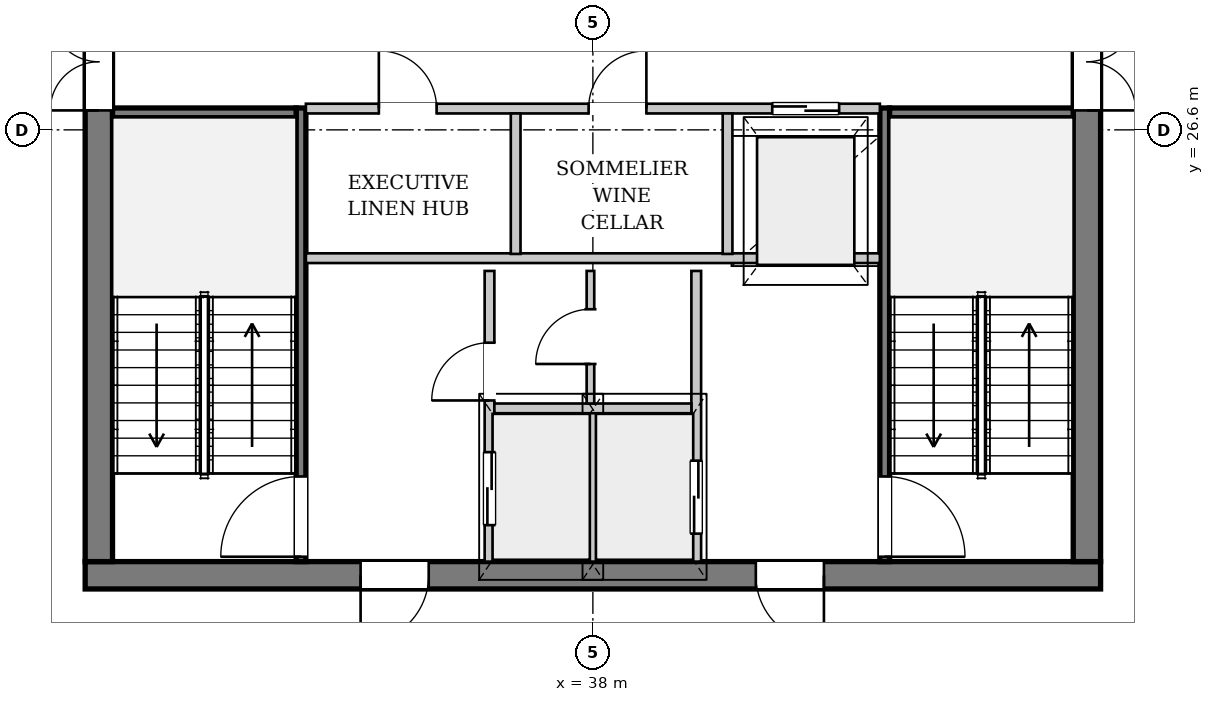
"""IFC4 building model, lengths in metres.
Left out: names, types, materials, properties, quantities, classifications, styles, units other than length and angle.
Written with IfcOpenShell. Run it as: python <this file> out.ifc"""

import sys

from ifc_helpers import new_model, si_unit, direction, frame, frame_2d, origin, place, context, subcontext, project, spatial, rectangle, extrude, source, transform, mapped, element, fill, save


model = new_model("IFC4")
c1 = context("Model", 3, precision=1e-05, world=origin(), true_north=direction((0.0, 1.0)))
c2 = subcontext(c1, "Body", "Model", "MODEL_VIEW")
j1 = project(units=[si_unit("LENGTHUNIT", "METRE"), si_unit("PLANEANGLEUNIT", "RADIAN")], contexts=[c1])
p1 = place(None, origin())
s1 = spatial("IfcSite", under=j1, at=p1, CompositionType="ELEMENT")
p2 = place(p1, origin())
s2 = spatial("IfcBuilding", under=s1, at=p2, CompositionType="ELEMENT")
p3 = place(p2, frame((0.0, 0.0, 252.5)))
s3 = spatial("IfcBuildingStorey", under=s2, at=p3, CompositionType="ELEMENT", Elevation=252.5)
p4 = place(p3, frame((52.264, 25.817, 0.0), z_axis=(0.0, 0.0, 1.0), x_axis=(-0.329283040193, -0.944231263749, 0.0)))
e1 = element("IfcWall", 1, at=p4, inside=s3, PredefinedType="SOLIDWALL", context=c2, shape_type="SweptSolid", body=[
    extrude(rectangle(XDim=22.663, YDim=0.32, at=frame_2d((11.332, 0.0))), origin(), (0.0, 0.0, 1.0), 2.872),
])
p5 = place(p4, frame((6.502, 0.0, 0.0)))
e2 = element("IfcOpeningElement", 2, at=p5, cuts=e1, PredefinedType="OPENING", context=c2, shape_type="SweptSolid", body=[
    extrude(rectangle(XDim=1.5, YDim=2.3, at=frame_2d((0.75, 1.15))), frame((0.0, 0.17, 0.0), z_axis=(0.0, -1.0, 0.0), x_axis=(1.0, 0.0, 0.0)), (0.0, 0.0, 1.0), 0.34),
])
p6 = place(p4, frame((15.471, 0.0, 0.402)))
e3 = element("IfcOpeningElement", 3, at=p6, cuts=e1, PredefinedType="OPENING", context=c2, shape_type="SweptSolid", body=[
    extrude(rectangle(XDim=2.6, YDim=2.35, at=frame_2d((1.3, 1.175))), frame((0.0, 0.17, 0.0), z_axis=(0.0, -1.0, 0.0), x_axis=(1.0, 0.0, 0.0)), (0.0, 0.0, 1.0), 0.34),
])
p7 = place(p3, frame((46.35, 19.275, 0.0), z_axis=(0.0, 0.0, 1.0), x_axis=(-1.0, 0.0, 0.0)))
e4 = element("IfcWall", 4, at=p7, inside=s3, PredefinedType="SHEAR", context=c2, shape_type="SweptSolid", body=[
    extrude(rectangle(XDim=16.7, YDim=0.45, at=frame_2d((8.35, 0.0))), origin(), (0.0, 0.0, 1.0), 3.38),
])
p8 = place(p7, frame((4.55, 0.0, 0.0)))
e5 = element("IfcOpeningElement", 5, at=p8, cuts=e4, PredefinedType="OPENING", context=c2, shape_type="SweptSolid", body=[
    extrude(rectangle(XDim=1.12, YDim=2.25, at=frame_2d((0.56, 1.125))), frame((0.0, 0.235, 0.0), z_axis=(0.0, -1.0, 0.0), x_axis=(1.0, 0.0, 0.0)), (0.0, 0.0, 1.0), 0.47),
])
p9 = place(p7, frame((11.05, 0.0, 0.0)))
e6 = element("IfcOpeningElement", 6, at=p9, cuts=e4, PredefinedType="OPENING", context=c2, shape_type="SweptSolid", body=[
    extrude(rectangle(XDim=1.12, YDim=2.25, at=frame_2d((0.56, 1.125))), frame((0.0, 0.235, 0.0), z_axis=(0.0, -1.0, 0.0), x_axis=(1.0, 0.0, 0.0)), (0.0, 0.0, 1.0), 0.47),
])
p10 = place(p3, frame((29.875, 19.5, 0.0), z_axis=(0.0, 0.0, 1.0), x_axis=(0.0, 1.0, 0.0)))
e7 = element("IfcWall", 7, at=p10, inside=s3, PredefinedType="SHEAR", context=c2, shape_type="SweptSolid", body=[
    extrude(rectangle(XDim=14.2, YDim=0.45, at=frame_2d((7.1, 0.0))), origin(), (0.0, 0.0, 1.0), 3.38),
])
p11 = place(p10, frame((7.42, 0.0, 0.0)))
e8 = element("IfcOpeningElement", 8, at=p11, cuts=e7, PredefinedType="OPENING", context=c2, shape_type="SweptSolid", body=[
    extrude(rectangle(XDim=1.6, YDim=2.2, at=frame_2d((0.8, 1.1))), frame((0.0, 0.235, 0.0), z_axis=(0.0, -1.0, 0.0), x_axis=(1.0, 0.0, 0.0)), (0.0, 0.0, 1.0), 0.47),
])
p12 = place(p3, frame((46.125, 33.7, 0.0), z_axis=(0.0, 0.0, 1.0), x_axis=(0.0, -1.0, 0.0)))
e9 = element("IfcWall", 9, at=p12, inside=s3, PredefinedType="SHEAR", context=c2, shape_type="SweptSolid", body=[
    extrude(rectangle(XDim=14.2, YDim=0.45, at=frame_2d((7.1, 0.0))), origin(), (0.0, 0.0, 1.0), 3.38),
])
p13 = place(p12, frame((5.18, 0.0, 0.0)))
e10 = element("IfcOpeningElement", 10, at=p13, cuts=e9, PredefinedType="OPENING", context=c2, shape_type="SweptSolid", body=[
    extrude(rectangle(XDim=1.6, YDim=2.2, at=frame_2d((0.8, 1.1))), frame((0.0, 0.235, 0.0), z_axis=(0.0, -1.0, 0.0), x_axis=(1.0, 0.0, 0.0)), (0.0, 0.0, 1.0), 0.47),
])
p14 = place(p12, frame((2.05, 0.0, 0.0)))
e11 = element("IfcOpeningElement", 11, at=p14, cuts=e9, PredefinedType="OPENING", context=c2, shape_type="SweptSolid", body=[
    extrude(rectangle(XDim=0.95, YDim=2.1, at=frame_2d((0.475, 1.05))), frame((0.0, 0.235, 0.0), z_axis=(0.0, -1.0, 0.0), x_axis=(1.0, 0.0, 0.0)), (0.0, 0.0, 1.0), 0.47),
])
p15 = place(p3, frame((33.2, 19.5, 0.0), z_axis=(0.0, 0.0, 1.0), x_axis=(0.0, 1.0, 0.0)))
e12 = element("IfcWall", 12, at=p15, inside=s3, PredefinedType="PARTITIONING", context=c2, shape_type="SweptSolid", body=[
    extrude(rectangle(XDim=7.46, YDim=0.16, at=frame_2d((3.73, 0.0))), origin(), (0.0, 0.0, 1.0), 3.38),
])
p16 = place(p15, frame((0.08, 0.0, 0.0)))
e13 = element("IfcOpeningElement", 13, at=p16, cuts=e12, PredefinedType="OPENING", context=c2, shape_type="SweptSolid", body=[
    extrude(rectangle(XDim=1.32, YDim=2.2, at=frame_2d((0.66, 1.1))), frame((0.0, 0.09, 0.0), z_axis=(0.0, -1.0, 0.0), x_axis=(1.0, 0.0, 0.0)), (0.0, 0.0, 1.0), 0.18),
])
p17 = place(p3, frame((30.1, 26.88, 0.0), z_axis=(0.0, 0.0, 1.0), x_axis=(1.0, 0.0, 0.0)))
e14 = element("IfcWall", 14, at=p17, inside=s3, PredefinedType="PARTITIONING", context=c2, shape_type="SweptSolid", body=[
    extrude(rectangle(XDim=3.02, YDim=0.16, at=frame_2d((1.51, 0.0))), origin(), (0.0, 0.0, 1.0), 3.38),
])
p18 = place(p3, frame((42.8, 26.96, 0.0), z_axis=(0.0, 0.0, 1.0), x_axis=(0.0, -1.0, 0.0)))
e15 = element("IfcWall", 15, at=p18, inside=s3, PredefinedType="PARTITIONING", context=c2, shape_type="SweptSolid", body=[
    extrude(rectangle(XDim=7.46, YDim=0.16, at=frame_2d((3.73, 0.0))), origin(), (0.0, 0.0, 1.0), 3.38),
])
p19 = place(p18, frame((6.06, 0.0, 0.0)))
e16 = element("IfcOpeningElement", 16, at=p19, cuts=e15, PredefinedType="OPENING", context=c2, shape_type="SweptSolid", body=[
    extrude(rectangle(XDim=1.32, YDim=2.2, at=frame_2d((0.66, 1.1))), frame((0.0, 0.09, 0.0), z_axis=(0.0, -1.0, 0.0), x_axis=(1.0, 0.0, 0.0)), (0.0, 0.0, 1.0), 0.18),
])
p20 = place(p3, frame((42.88, 26.88, 0.0), z_axis=(0.0, 0.0, 1.0), x_axis=(1.0, 0.0, 0.0)))
e17 = element("IfcWall", 17, at=p20, inside=s3, PredefinedType="PARTITIONING", context=c2, shape_type="SweptSolid", body=[
    extrude(rectangle(XDim=3.02, YDim=0.16, at=frame_2d((1.51, 0.0))), origin(), (0.0, 0.0, 1.0), 3.38),
])
p21 = place(p3, frame((36.3, 19.5, 0.0), z_axis=(0.0, 0.0, 1.0), x_axis=(0.0, 1.0, 0.0)))
e18 = element("IfcWall", 18, at=p21, inside=s3, PredefinedType="PARTITIONING", context=c2, shape_type="SweptSolid", body=[
    extrude(rectangle(XDim=4.78, YDim=0.16, at=frame_2d((2.39, 0.0))), origin(), (0.0, 0.0, 1.0), 3.38),
])
p22 = place(p21, frame((0.6, 0.0, 0.0)))
e19 = element("IfcOpeningElement", 19, at=p22, cuts=e18, PredefinedType="OPENING", context=c2, shape_type="SweptSolid", body=[
    extrude(rectangle(XDim=1.2, YDim=2.2, at=frame_2d((0.6, 1.1))), frame((0.0, 0.09, 0.0), z_axis=(0.0, -1.0, 0.0), x_axis=(1.0, 0.0, 0.0)), (0.0, 0.0, 1.0), 0.18),
])
p23 = place(p21, frame((2.65, 0.0, 0.0)))
e20 = element("IfcOpeningElement", 20, at=p23, cuts=e18, PredefinedType="OPENING", context=c2, shape_type="SweptSolid", body=[
    extrude(rectangle(XDim=0.95, YDim=2.1, at=frame_2d((0.475, 1.05))), frame((0.0, 0.09, 0.0), z_axis=(0.0, -1.0, 0.0), x_axis=(1.0, 0.0, 0.0)), (0.0, 0.0, 1.0), 0.18),
])
p24 = place(p3, frame((39.7, 24.28, 0.0), z_axis=(0.0, 0.0, 1.0), x_axis=(0.0, -1.0, 0.0)))
e21 = element("IfcWall", 21, at=p24, inside=s3, PredefinedType="PARTITIONING", context=c2, shape_type="SweptSolid", body=[
    extrude(rectangle(XDim=4.78, YDim=0.16, at=frame_2d((2.39, 0.0))), origin(), (0.0, 0.0, 1.0), 3.38),
])
p25 = place(p24, frame((3.12, 0.0, 0.0)))
e22 = element("IfcOpeningElement", 22, at=p25, cuts=e21, PredefinedType="OPENING", context=c2, shape_type="SweptSolid", body=[
    extrude(rectangle(XDim=1.2, YDim=2.2, at=frame_2d((0.6, 1.1))), frame((0.0, 0.09, 0.0), z_axis=(0.0, -1.0, 0.0), x_axis=(1.0, 0.0, 0.0)), (0.0, 0.0, 1.0), 0.18),
])
p26 = place(p3, frame((38.0, 19.5, 0.0), z_axis=(0.0, 0.0, 1.0), x_axis=(0.0, 1.0, 0.0)))
e23 = element("IfcWall", 23, at=p26, inside=s3, PredefinedType="PARTITIONING", context=c2, shape_type="SweptSolid", body=[
    extrude(rectangle(XDim=2.46, YDim=0.125, at=frame_2d((1.23, 0.0))), origin(), (0.0, 0.0, 1.0), 3.38),
])
p27 = place(p3, frame((36.38, 22.02, 0.0), z_axis=(0.0, 0.0, 1.0), x_axis=(1.0, 0.0, 0.0)))
e24 = element("IfcWall", 24, at=p27, inside=s3, PredefinedType="PARTITIONING", context=c2, shape_type="SweptSolid", body=[
    extrude(rectangle(XDim=3.24, YDim=0.16, at=frame_2d((1.62, 0.0))), origin(), (0.0, 0.0, 1.0), 3.38),
])
p28 = place(p3, frame((33.28, 24.49, 0.0), z_axis=(0.0, 0.0, 1.0), x_axis=(1.0, 0.0, 0.0)))
e25 = element("IfcWall", 25, at=p28, inside=s3, PredefinedType="PARTITIONING", context=c2, shape_type="SweptSolid", body=[
    extrude(rectangle(XDim=9.44, YDim=0.16, at=frame_2d((4.72, 0.0))), origin(), (0.0, 0.0, 1.0), 3.38),
])
p29 = place(p3, frame((37.96, 22.1, 0.0), z_axis=(0.0, 0.0, 1.0), x_axis=(0.0, 1.0, 0.0)))
e26 = element("IfcWall", 26, at=p29, inside=s3, PredefinedType="PARTITIONING", context=c2, shape_type="SweptSolid", body=[
    extrude(rectangle(XDim=2.18, YDim=0.125, at=frame_2d((1.09, 0.0))), origin(), (0.0, 0.0, 1.0), 3.38),
])
p30 = place(p29, frame((0.65, 0.0, 0.0)))
e27 = element("IfcOpeningElement", 27, at=p30, cuts=e26, PredefinedType="OPENING", context=c2, shape_type="SweptSolid", body=[
    extrude(rectangle(XDim=0.9, YDim=2.1, at=frame_2d((0.45, 1.05))), frame((0.0, 0.073, 0.0), z_axis=(0.0, -1.0, 0.0), x_axis=(1.0, 0.0, 0.0)), (0.0, 0.0, 1.0), 0.145),
])
p31 = place(p3, frame((33.28, 26.95, 0.0), z_axis=(0.0, 0.0, 1.0), x_axis=(1.0, 0.0, 0.0)))
e28 = element("IfcWall", 28, at=p31, inside=s3, PredefinedType="PARTITIONING", context=c2, shape_type="SweptSolid", body=[
    extrude(rectangle(XDim=9.44, YDim=0.16, at=frame_2d((4.72, 0.0))), origin(), (0.0, 0.0, 1.0), 3.38),
])
p32 = place(p31, frame((1.2, 0.0, 0.0)))
e29 = element("IfcOpeningElement", 29, at=p32, cuts=e28, PredefinedType="OPENING", context=c2, shape_type="SweptSolid", body=[
    extrude(rectangle(XDim=0.95, YDim=2.1, at=frame_2d((0.475, 1.05))), frame((0.0, 0.09, 0.0), z_axis=(0.0, -1.0, 0.0), x_axis=(1.0, 0.0, 0.0)), (0.0, 0.0, 1.0), 0.18),
])
p33 = place(p31, frame((4.65, 0.0, 0.0)))
e30 = element("IfcOpeningElement", 30, at=p33, cuts=e28, PredefinedType="OPENING", context=c2, shape_type="SweptSolid", body=[
    extrude(rectangle(XDim=0.95, YDim=2.1, at=frame_2d((0.475, 1.05))), frame((0.0, 0.09, 0.0), z_axis=(0.0, -1.0, 0.0), x_axis=(1.0, 0.0, 0.0)), (0.0, 0.0, 1.0), 0.18),
])
p34 = place(p31, frame((7.67, 0.0, 0.0)))
e31 = element("IfcOpeningElement", 31, at=p34, cuts=e28, PredefinedType="OPENING", context=c2, shape_type="SweptSolid", body=[
    extrude(rectangle(XDim=1.1, YDim=2.2, at=frame_2d((0.55, 1.1))), frame((0.0, 0.09, 0.0), z_axis=(0.0, -1.0, 0.0), x_axis=(1.0, 0.0, 0.0)), (0.0, 0.0, 1.0), 0.18),
])
for number, where, z_axis, x_axis in (
    (32, (36.73, 24.56, 0.0), (0.0, 0.0, 1.0), (0.0, 1.0, 0.0)),
    (33, (40.215, 24.56, 0.0), (0.0, 0.0, 1.0), (0.0, 1.0, 0.0)),
):
    element("IfcWall", number, at=place(p3, frame(where, z_axis=z_axis, x_axis=x_axis)), inside=s3, PredefinedType="PARTITIONING", context=c2, shape_type="SweptSolid", body=[
        extrude(rectangle(XDim=2.31, YDim=0.16, at=frame_2d((1.155, 0.0))), origin(), (0.0, 0.0, 1.0), 3.38),
    ])
m1 = source(origin(), c2, "Body", "SweptSolid", [
    extrude(rectangle(XDim=1.12, YDim=2.25, at=frame_2d((0.56, 1.125))), frame((0.0, 0.025, 0.0), z_axis=(0.0, -1.0, 0.0), x_axis=(1.0, 0.0, 0.0)), (0.0, 0.0, 1.0), 0.05),
])
p35 = place(p8, origin())
e34 = element("IfcDoor", 34, at=p35, inside=s3, OperationType="SINGLE_SWING_LEFT", PredefinedType="DOOR", context=c2, shape_type="MappedRepresentation", body=[
    mapped(m1, transform((0.0, 0.0, 0.0), x_axis=(1.0, 0.0, 0.0), y_axis=(0.0, 1.0, 0.0), z_axis=(0.0, 0.0, 1.0), scale=1.0)),
])
fill(e5, e34)
p36 = place(p9, origin())
e35 = element("IfcDoor", 35, at=p36, inside=s3, OperationType="SINGLE_SWING_RIGHT", PredefinedType="DOOR", context=c2, shape_type="MappedRepresentation", body=[
    mapped(m1, transform((0.0, 0.0, 0.0), x_axis=(1.0, 0.0, 0.0), y_axis=(0.0, 1.0, 0.0), z_axis=(0.0, 0.0, 1.0), scale=1.0)),
])
fill(e6, e35)
m2 = source(origin(), c2, "Body", "SweptSolid", [
    extrude(rectangle(XDim=1.6, YDim=2.2, at=frame_2d((0.8, 1.1))), frame((0.0, 0.025, 0.0), z_axis=(0.0, -1.0, 0.0), x_axis=(1.0, 0.0, 0.0)), (0.0, 0.0, 1.0), 0.05),
])
p37 = place(p11, origin())
e36 = element("IfcDoor", 36, at=p37, inside=s3, OperationType="DOUBLE_DOOR_SINGLE_SWING", PredefinedType="DOOR", context=c2, shape_type="MappedRepresentation", body=[
    mapped(m2, transform((0.0, 0.0, 0.0), x_axis=(1.0, 0.0, 0.0), y_axis=(0.0, 1.0, 0.0), z_axis=(0.0, 0.0, 1.0), scale=1.0)),
])
fill(e8, e36)
p38 = place(p13, origin())
e37 = element("IfcDoor", 37, at=p38, inside=s3, OperationType="DOUBLE_DOOR_SINGLE_SWING", PredefinedType="DOOR", context=c2, shape_type="MappedRepresentation", body=[
    mapped(m2, transform((0.0, 0.0, 0.0), x_axis=(1.0, 0.0, 0.0), y_axis=(0.0, 1.0, 0.0), z_axis=(0.0, 0.0, 1.0), scale=1.0)),
])
fill(e10, e37)
m3 = source(origin(), c2, "Body", "SweptSolid", [
    extrude(rectangle(XDim=1.32, YDim=2.2, at=frame_2d((0.66, 1.1))), frame((0.0, 0.025, 0.0), z_axis=(0.0, -1.0, 0.0), x_axis=(1.0, 0.0, 0.0)), (0.0, 0.0, 1.0), 0.05),
])
p39 = place(p16, origin())
e38 = element("IfcDoor", 38, at=p39, inside=s3, OperationType="SINGLE_SWING_LEFT", PredefinedType="DOOR", context=c2, shape_type="MappedRepresentation", body=[
    mapped(m3, transform((0.0, 0.0, 0.0), x_axis=(1.0, 0.0, 0.0), y_axis=(0.0, 1.0, 0.0), z_axis=(0.0, 0.0, 1.0), scale=1.0)),
])
fill(e13, e38)
p40 = place(p19, origin())
e39 = element("IfcDoor", 39, at=p40, inside=s3, OperationType="SINGLE_SWING_RIGHT", PredefinedType="DOOR", context=c2, shape_type="MappedRepresentation", body=[
    mapped(m3, transform((0.0, 0.0, 0.0), x_axis=(1.0, 0.0, 0.0), y_axis=(0.0, 1.0, 0.0), z_axis=(0.0, 0.0, 1.0), scale=1.0)),
])
fill(e16, e39)
m4 = source(origin(), c2, "Body", "SweptSolid", [
    extrude(rectangle(XDim=1.2, YDim=2.2, at=frame_2d((0.6, 1.1))), frame((0.0, 0.025, 0.0), z_axis=(0.0, -1.0, 0.0), x_axis=(1.0, 0.0, 0.0)), (0.0, 0.0, 1.0), 0.05),
])
p41 = place(p22, origin())
e40 = element("IfcDoor", 40, at=p41, inside=s3, OperationType="DOUBLE_DOOR_SLIDING", PredefinedType="DOOR", context=c2, shape_type="MappedRepresentation", body=[
    mapped(m4, transform((0.0, 0.0, 0.0), x_axis=(1.0, 0.0, 0.0), y_axis=(0.0, 1.0, 0.0), z_axis=(0.0, 0.0, 1.0), scale=1.0)),
])
fill(e19, e40)
m5 = source(origin(), c2, "Body", "SweptSolid", [
    extrude(rectangle(XDim=0.95, YDim=2.1, at=frame_2d((0.475, 1.05))), frame((0.0, 0.025, 0.0), z_axis=(0.0, -1.0, 0.0), x_axis=(1.0, 0.0, 0.0)), (0.0, 0.0, 1.0), 0.05),
])
p42 = place(p23, origin())
e41 = element("IfcDoor", 41, at=p42, inside=s3, OperationType="SINGLE_SWING_LEFT", PredefinedType="DOOR", context=c2, shape_type="MappedRepresentation", body=[
    mapped(m5, transform((0.0, 0.0, 0.0), x_axis=(1.0, 0.0, 0.0), y_axis=(0.0, 1.0, 0.0), z_axis=(0.0, 0.0, 1.0), scale=1.0)),
])
fill(e20, e41)
m6 = source(origin(), c2, "Body", "SweptSolid", [
    extrude(rectangle(XDim=0.9, YDim=2.1, at=frame_2d((0.45, 1.05))), frame((0.0, 0.025, 0.0), z_axis=(0.0, -1.0, 0.0), x_axis=(1.0, 0.0, 0.0)), (0.0, 0.0, 1.0), 0.05),
])
p43 = place(p30, origin())
e42 = element("IfcDoor", 42, at=p43, inside=s3, OperationType="SINGLE_SWING_LEFT", PredefinedType="DOOR", context=c2, shape_type="MappedRepresentation", body=[
    mapped(m6, transform((0.0, 0.0, 0.0), x_axis=(1.0, 0.0, 0.0), y_axis=(0.0, 1.0, 0.0), z_axis=(0.0, 0.0, 1.0), scale=1.0)),
])
fill(e27, e42)
p44 = place(p25, origin())
e43 = element("IfcDoor", 43, at=p44, inside=s3, OperationType="DOUBLE_DOOR_SLIDING", PredefinedType="DOOR", context=c2, shape_type="MappedRepresentation", body=[
    mapped(m4, transform((0.0, 0.0, 0.0), x_axis=(1.0, 0.0, 0.0), y_axis=(0.0, 1.0, 0.0), z_axis=(0.0, 0.0, 1.0), scale=1.0)),
])
fill(e22, e43)
p45 = place(p32, origin())
e44 = element("IfcDoor", 44, at=p45, inside=s3, OperationType="SINGLE_SWING_LEFT", PredefinedType="DOOR", context=c2, shape_type="MappedRepresentation", body=[
    mapped(m5, transform((0.0, 0.0, 0.0), x_axis=(1.0, 0.0, 0.0), y_axis=(0.0, 1.0, 0.0), z_axis=(0.0, 0.0, 1.0), scale=1.0)),
])
fill(e29, e44)
p46 = place(p33, origin())
e45 = element("IfcDoor", 45, at=p46, inside=s3, OperationType="SINGLE_SWING_RIGHT", PredefinedType="DOOR", context=c2, shape_type="MappedRepresentation", body=[
    mapped(m5, transform((0.0, 0.0, 0.0), x_axis=(1.0, 0.0, 0.0), y_axis=(0.0, 1.0, 0.0), z_axis=(0.0, 0.0, 1.0), scale=1.0)),
])
fill(e30, e45)
m7 = source(origin(), c2, "Body", "SweptSolid", [
    extrude(rectangle(XDim=1.1, YDim=2.2, at=frame_2d((0.55, 1.1))), frame((0.0, 0.025, 0.0), z_axis=(0.0, -1.0, 0.0), x_axis=(1.0, 0.0, 0.0)), (0.0, 0.0, 1.0), 0.05),
])
p47 = place(p34, origin())
e46 = element("IfcDoor", 46, at=p47, inside=s3, OperationType="DOUBLE_DOOR_SLIDING", PredefinedType="DOOR", context=c2, shape_type="MappedRepresentation", body=[
    mapped(m7, transform((0.0, 0.0, 0.0), x_axis=(1.0, 0.0, 0.0), y_axis=(0.0, 1.0, 0.0), z_axis=(0.0, 0.0, 1.0), scale=1.0)),
])
fill(e31, e46)
save(model, sys.argv[1])
